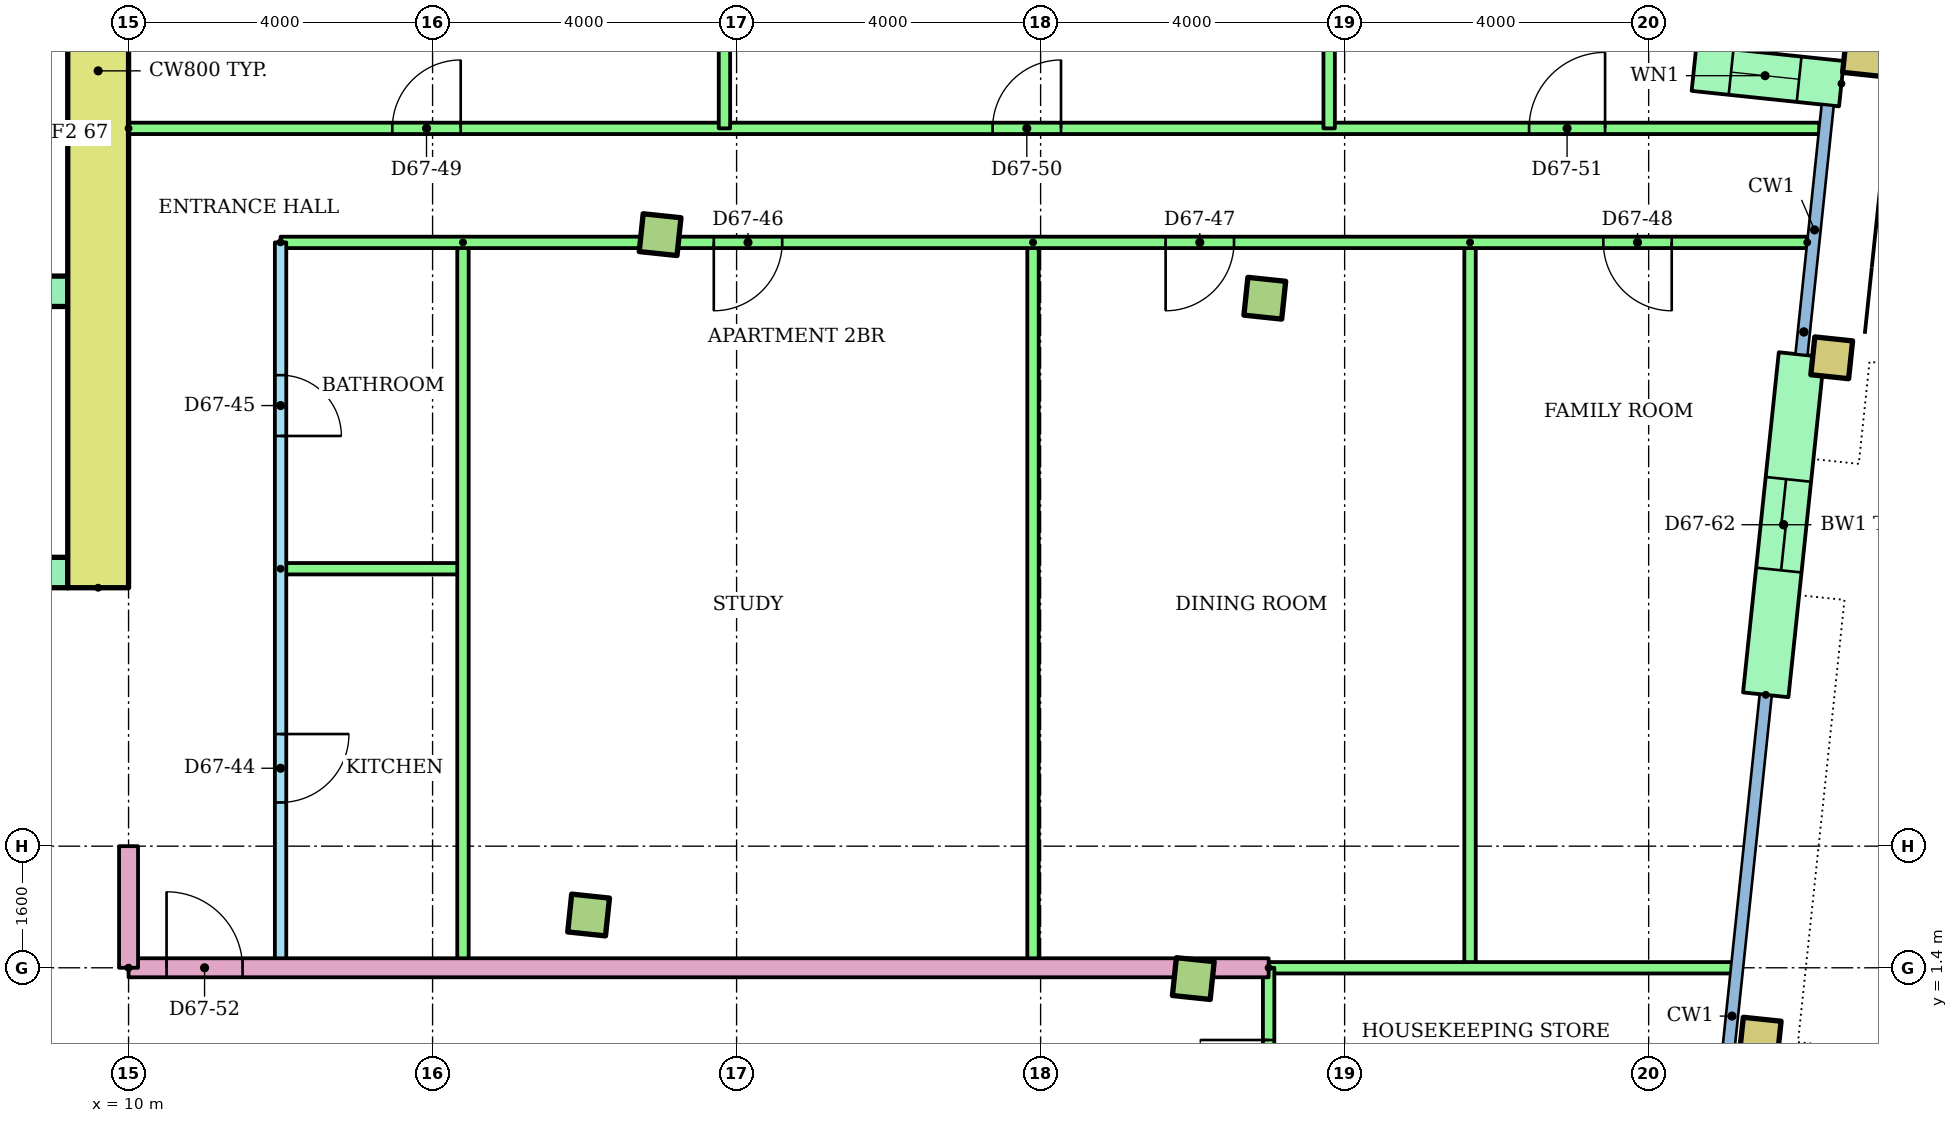
"""IFC4 building model, lengths in metres.
Left out: names, types, materials, properties, quantities, classifications, styles, units other than length and angle.
Written with IfcOpenShell. Run it as: python <this file> out.ifc"""

import sys

from ifc_helpers import new_model, si_unit, direction, frame, frame_2d, origin, origin_2d, place, context, subcontext, project, spatial, rectangle, hollow_rectangle, extrude, element, fill, save


model = new_model("IFC4")
c1 = context("Model", 3, precision=1e-05, world=origin(), true_north=direction((0.0, 1.0)))
c2 = subcontext(c1, "Body", "Model", "MODEL_VIEW")
j1 = project(units=[si_unit("LENGTHUNIT", "METRE"), si_unit("PLANEANGLEUNIT", "RADIAN")], contexts=[c1])
p1 = place(None, origin())
s1 = spatial("IfcSite", under=j1, at=p1, CompositionType="ELEMENT")
p2 = place(p1, origin())
s2 = spatial("IfcBuilding", under=s1, at=p2, CompositionType="ELEMENT")
p3 = place(p2, frame((0.0, 0.0, 259.5)))
s3 = spatial("IfcBuildingStorey", under=s2, at=p3, CompositionType="ELEMENT", Elevation=259.5)
for number, where, z_axis, x_axis in (
    (1, (16.053, 2.094, 0.0), (0.0, 0.0, 1.0), (0.995, -0.105, 0.0)),
    (2, (24.009, 1.258, 0.0), (0.0, 0.0, 1.0), (0.995, -0.105, 0.0)),
):
    element("IfcColumn", number, at=place(p3, frame(where, z_axis=z_axis, x_axis=x_axis)), inside=s3, PredefinedType="COLUMN", context=c2, shape_type="SweptSolid", body=[
        extrude(rectangle(XDim=0.5, YDim=0.5, at=origin_2d()), origin(), (0.0, 0.0, 1.0), 3.2),
    ])
p4 = place(p3, frame((31.468, 0.474, 0.0), z_axis=(0.0, 0.0, 1.0), x_axis=(0.994521895368, -0.104528463268, 0.0)))
e3 = element("IfcColumn", 3, at=p4, inside=s3, PredefinedType="COLUMN", context=c2, shape_type="SweptSolid", body=[
    extrude(hollow_rectangle(XDim=0.5, YDim=0.5, WallThickness=0.025, at=origin_2d()), origin(), (0.0, 0.0, 1.0), 3.2),
])
for number, where, z_axis, x_axis in (
    (4, (16.993, 11.045, 0.0), (0.0, 0.0, 1.0), (0.995, -0.105, 0.0)),
    (5, (24.95, 10.209, 0.0), (0.0, 0.0, 1.0), (0.995, -0.105, 0.0)),
):
    element("IfcColumn", number, at=place(p3, frame(where, z_axis=z_axis, x_axis=x_axis)), inside=s3, PredefinedType="COLUMN", context=c2, shape_type="SweptSolid", body=[
        extrude(rectangle(XDim=0.5, YDim=0.5, at=origin_2d()), origin(), (0.0, 0.0, 1.0), 3.2),
    ])
for number, where, z_axis, x_axis in (
    (6, (32.409, 9.425, 0.0), (0.0, 0.0, 1.0), (0.995, -0.105, 0.0)),
    (7, (32.827, 13.403, 0.0), (0.0, 0.0, 1.0), (0.995, -0.105, 0.0)),
):
    element("IfcColumn", number, at=place(p3, frame(where, z_axis=z_axis, x_axis=x_axis)), inside=s3, PredefinedType="COLUMN", context=c2, shape_type="SweptSolid", body=[
        extrude(hollow_rectangle(XDim=0.5, YDim=0.5, WallThickness=0.025, at=origin_2d()), origin(), (0.0, 0.0, 1.0), 3.2),
    ])
p5 = place(p3, frame((32.536, 13.031, 0.0), z_axis=(0.0, 0.0, 1.0), x_axis=(-0.994534226826, 0.104411070641, 0.0)))
e8 = element("IfcWall", 8, at=p5, inside=s3, PredefinedType="STANDARD", context=c2, shape_type="SweptSolid", body=[
    extrude(rectangle(XDim=1.95, YDim=0.6, at=frame_2d((0.975, 0.0))), origin(), (0.0, 0.0, 1.0), 2.92),
])
p6 = place(p5, frame((0.56, 0.0, 0.9)))
e9 = element("IfcOpeningElement", 9, at=p6, cuts=e8, PredefinedType="OPENING", context=c2, shape_type="SweptSolid", body=[
    extrude(rectangle(XDim=0.9, YDim=1.5, at=frame_2d((0.45, 0.75))), frame((0.0, 0.31, 0.0), z_axis=(0.0, -1.0, 0.0), x_axis=(1.0, 0.0, 0.0)), (0.0, 0.0, 1.0), 0.62),
])
p7 = place(p3, frame((31.54, 4.991, 0.0), z_axis=(0.0, 0.0, 1.0), x_axis=(0.104546400045, 0.994520009974, 0.0)))
e10 = element("IfcWall", 10, at=p7, inside=s3, PredefinedType="STANDARD", context=c2, shape_type="SweptSolid", body=[
    extrude(rectangle(XDim=4.5, YDim=0.6, at=frame_2d((2.25, 0.0))), origin(), (0.0, 0.0, 1.0), 2.92),
])
p8 = place(p7, frame((1.65, 0.0, 0.0)))
e11 = element("IfcOpeningElement", 11, at=p8, cuts=e10, PredefinedType="OPENING", context=c2, shape_type="SweptSolid", body=[
    extrude(rectangle(XDim=1.2, YDim=2.1, at=frame_2d((0.6, 1.05))), frame((0.0, 0.31, 0.0), z_axis=(0.0, -1.0, 0.0), x_axis=(1.0, 0.0, 0.0)), (0.0, 0.0, 1.0), 0.62),
])
p9 = place(p3, frame((9.6, 6.4, 0.0), z_axis=(0.0, 0.0, 1.0), x_axis=(0.0, 1.0, 0.0)))
e12 = element("IfcWall", 12, at=p9, inside=s3, PredefinedType="SHEAR", context=c2, shape_type="SweptSolid", body=[
    extrude(rectangle(XDim=13.6, YDim=0.8, at=frame_2d((6.8, 0.0))), origin(), (0.0, 0.0, 1.0), 2.92),
])
p10 = place(p3, frame((-9.2, 6.6, 0.0)))
e13 = element("IfcWall", 13, at=p10, inside=s3, PredefinedType="SHEAR", context=c2, shape_type="SweptSolid", body=[
    extrude(rectangle(XDim=18.4, YDim=0.4, at=frame_2d((9.2, 0.0))), origin(), (0.0, 0.0, 1.0), 2.92),
])
p11 = place(p10, frame((8.3, 0.0, 0.0)))
e14 = element("IfcOpeningElement", 14, at=p11, cuts=e13, PredefinedType="OPENING", context=c2, shape_type="SweptSolid", body=[
    extrude(rectangle(XDim=1.8, YDim=2.1, at=frame_2d((0.9, 1.05))), frame((0.0, 0.21, 0.0), z_axis=(0.0, -1.0, 0.0), x_axis=(1.0, 0.0, 0.0)), (0.0, 0.0, 1.0), 0.42),
])
p12 = place(p10, frame((3.8, 0.0, 0.0)))
e15 = element("IfcOpeningElement", 15, at=p12, cuts=e13, PredefinedType="OPENING", context=c2, shape_type="SweptSolid", body=[
    extrude(rectangle(XDim=1.8, YDim=2.1, at=frame_2d((0.9, 1.05))), frame((0.0, 0.21, 0.0), z_axis=(0.0, -1.0, 0.0), x_axis=(1.0, 0.0, 0.0)), (0.0, 0.0, 1.0), 0.42),
])
p13 = place(p10, frame((12.8, 0.0, 0.0)))
e16 = element("IfcOpeningElement", 16, at=p13, cuts=e13, PredefinedType="OPENING", context=c2, shape_type="SweptSolid", body=[
    extrude(rectangle(XDim=1.8, YDim=2.1, at=frame_2d((0.9, 1.05))), frame((0.0, 0.21, 0.0), z_axis=(0.0, -1.0, 0.0), x_axis=(1.0, 0.0, 0.0)), (0.0, 0.0, 1.0), 0.42),
])
p14 = place(p3, frame((1.2, 10.3, 0.0)))
e17 = element("IfcWall", 17, at=p14, inside=s3, PredefinedType="SHEAR", context=c2, shape_type="SweptSolid", body=[
    extrude(rectangle(XDim=8.0, YDim=0.4, at=frame_2d((4.0, 0.0))), origin(), (0.0, 0.0, 1.0), 2.92),
])
p15 = place(p14, frame((0.817, 0.0, 0.0)))
e18 = element("IfcOpeningElement", 18, at=p15, cuts=e17, PredefinedType="OPENING", context=c2, shape_type="SweptSolid", body=[
    extrude(rectangle(XDim=1.1, YDim=2.1, at=frame_2d((0.55, 1.05))), frame((0.0, 0.21, 0.0), z_axis=(0.0, -1.0, 0.0), x_axis=(1.0, 0.0, 0.0)), (0.0, 0.0, 1.0), 0.42),
])
p16 = place(p14, frame((3.55, 0.0, 0.0)))
e19 = element("IfcOpeningElement", 19, at=p16, cuts=e17, PredefinedType="OPENING", context=c2, shape_type="SweptSolid", body=[
    extrude(rectangle(XDim=1.1, YDim=2.1, at=frame_2d((0.55, 1.05))), frame((0.0, 0.21, 0.0), z_axis=(0.0, -1.0, 0.0), x_axis=(1.0, 0.0, 0.0)), (0.0, 0.0, 1.0), 0.42),
])
p17 = place(p14, frame((6.283, 0.0, 0.0)))
e20 = element("IfcOpeningElement", 20, at=p17, cuts=e17, PredefinedType="OPENING", context=c2, shape_type="SweptSolid", body=[
    extrude(rectangle(XDim=1.1, YDim=2.1, at=frame_2d((0.55, 1.05))), frame((0.0, 0.21, 0.0), z_axis=(0.0, -1.0, 0.0), x_axis=(1.0, 0.0, 0.0)), (0.0, 0.0, 1.0), 0.42),
])
p18 = place(p3, frame((12.0, 10.943, 0.0), z_axis=(0.0, 0.0, 1.0), x_axis=(0.0, -1.0, 0.0)))
e21 = element("IfcWall", 21, at=p18, inside=s3, PredefinedType="PARTITIONING", context=c2, shape_type="SweptSolid", body=[
    extrude(rectangle(XDim=9.543, YDim=0.15, at=frame_2d((4.772, 0.0))), origin(), (0.0, 0.0, 1.0), 2.4),
])
p19 = place(p18, frame((6.469, 0.0, 0.0)))
e22 = element("IfcOpeningElement", 22, at=p19, cuts=e21, PredefinedType="OPENING", context=c2, shape_type="SweptSolid", body=[
    extrude(rectangle(XDim=0.9, YDim=2.1, at=frame_2d((0.45, 1.05))), frame((0.0, 0.085, 0.0), z_axis=(0.0, -1.0, 0.0), x_axis=(1.0, 0.0, 0.0)), (0.0, 0.0, 1.0), 0.17),
])
p20 = place(p18, frame((1.747, 0.0, 0.0)))
e23 = element("IfcOpeningElement", 23, at=p20, cuts=e21, PredefinedType="OPENING", context=c2, shape_type="SweptSolid", body=[
    extrude(rectangle(XDim=0.8, YDim=2.1, at=frame_2d((0.4, 1.05))), frame((0.0, 0.085, 0.0), z_axis=(0.0, -1.0, 0.0), x_axis=(1.0, 0.0, 0.0)), (0.0, 0.0, 1.0), 0.17),
])
p21 = place(p3, frame((12.0, 6.65, 0.0)))
e24 = element("IfcWall", 24, at=p21, inside=s3, PredefinedType="PARTITIONING", context=c2, shape_type="SweptSolid", body=[
    extrude(rectangle(XDim=2.4, YDim=0.15, at=frame_2d((1.2, 0.0))), origin(), (0.0, 0.0, 1.0), 2.4),
])
for number, where, z_axis, x_axis in (
    (25, (14.4, 10.943, 0.0), (0.0, 0.0, 1.0), (0.0, -1.0, 0.0)),
    (26, (21.9, 10.943, 0.0), (0.0, 0.0, 1.0), (0.0, -1.0, 0.0)),
    (27, (27.65, 10.943, 0.0), (0.0, 0.0, 1.0), (0.0, -1.0, 0.0)),
):
    element("IfcWall", number, at=place(p3, frame(where, z_axis=z_axis, x_axis=x_axis)), inside=s3, PredefinedType="PARTITIONING", context=c2, shape_type="SweptSolid", body=[
        extrude(rectangle(XDim=9.543, YDim=0.15, at=frame_2d((4.772, 0.0))), origin(), (0.0, 0.0, 1.0), 2.4),
    ])
p22 = place(p3, frame((32.087, 10.943, 0.0), z_axis=(0.0, 0.0, 1.0), x_axis=(-1.0, 0.0, 0.0)))
e28 = element("IfcWall", 28, at=p22, inside=s3, PredefinedType="PARTITIONING", context=c2, shape_type="SweptSolid", body=[
    extrude(rectangle(XDim=20.087, YDim=0.15, at=frame_2d((10.043, 0.0))), origin(), (0.0, 0.0, 1.0), 2.4),
])
p23 = place(p22, frame((13.487, 0.0, 0.0)))
e29 = element("IfcOpeningElement", 29, at=p23, cuts=e28, PredefinedType="OPENING", context=c2, shape_type="SweptSolid", body=[
    extrude(rectangle(XDim=0.9, YDim=2.1, at=frame_2d((0.45, 1.05))), frame((0.0, 0.085, 0.0), z_axis=(0.0, -1.0, 0.0), x_axis=(1.0, 0.0, 0.0)), (0.0, 0.0, 1.0), 0.17),
])
p24 = place(p22, frame((7.542, 0.0, 0.0)))
e30 = element("IfcOpeningElement", 30, at=p24, cuts=e28, PredefinedType="OPENING", context=c2, shape_type="SweptSolid", body=[
    extrude(rectangle(XDim=0.9, YDim=2.1, at=frame_2d((0.45, 1.05))), frame((0.0, 0.085, 0.0), z_axis=(0.0, -1.0, 0.0), x_axis=(1.0, 0.0, 0.0)), (0.0, 0.0, 1.0), 0.17),
])
p25 = place(p22, frame((1.783, 0.0, 0.0)))
e31 = element("IfcOpeningElement", 31, at=p25, cuts=e28, PredefinedType="OPENING", context=c2, shape_type="SweptSolid", body=[
    extrude(rectangle(XDim=0.9, YDim=2.1, at=frame_2d((0.45, 1.05))), frame((0.0, 0.085, 0.0), z_axis=(0.0, -1.0, 0.0), x_axis=(1.0, 0.0, 0.0)), (0.0, 0.0, 1.0), 0.17),
])
p26 = place(p3, frame((10.0, 12.443, 0.0)))
e32 = element("IfcWall", 32, at=p26, inside=s3, PredefinedType="PARTITIONING", context=c2, shape_type="SweptSolid", body=[
    extrude(rectangle(XDim=22.244, YDim=0.15, at=frame_2d((11.122, 0.0))), origin(), (0.0, 0.0, 1.0), 2.4),
])
p27 = place(p26, frame((3.47, 0.0, 0.0)))
e33 = element("IfcOpeningElement", 33, at=p27, cuts=e32, PredefinedType="OPENING", context=c2, shape_type="SweptSolid", body=[
    extrude(rectangle(XDim=0.9, YDim=2.1, at=frame_2d((0.45, 1.05))), frame((0.0, 0.085, 0.0), z_axis=(0.0, -1.0, 0.0), x_axis=(1.0, 0.0, 0.0)), (0.0, 0.0, 1.0), 0.17),
])
p28 = place(p26, frame((11.368, 0.0, 0.0)))
e34 = element("IfcOpeningElement", 34, at=p28, cuts=e32, PredefinedType="OPENING", context=c2, shape_type="SweptSolid", body=[
    extrude(rectangle(XDim=0.9, YDim=2.1, at=frame_2d((0.45, 1.05))), frame((0.0, 0.085, 0.0), z_axis=(0.0, -1.0, 0.0), x_axis=(1.0, 0.0, 0.0)), (0.0, 0.0, 1.0), 0.17),
])
p29 = place(p26, frame((18.427, 0.0, 0.0)))
e35 = element("IfcOpeningElement", 35, at=p29, cuts=e32, PredefinedType="OPENING", context=c2, shape_type="SweptSolid", body=[
    extrude(rectangle(XDim=1.0, YDim=2.1, at=frame_2d((0.5, 1.05))), frame((0.0, 0.085, 0.0), z_axis=(0.0, -1.0, 0.0), x_axis=(1.0, 0.0, 0.0)), (0.0, 0.0, 1.0), 0.17),
])
p30 = place(p3, frame((17.84, 19.021, 0.0), z_axis=(0.0, 0.0, 1.0), x_axis=(0.0, -1.0, 0.0)))
e36 = element("IfcWall", 36, at=p30, inside=s3, PredefinedType="PARTITIONING", context=c2, shape_type="SweptSolid", body=[
    extrude(rectangle(XDim=6.578, YDim=0.15, at=frame_2d((3.289, 0.0))), origin(), (0.0, 0.0, 1.0), 2.4),
])
p31 = place(p3, frame((25.796, 18.185, 0.0), z_axis=(0.0, 0.0, 1.0), x_axis=(0.0, -1.0, 0.0)))
e37 = element("IfcWall", 37, at=p31, inside=s3, PredefinedType="PARTITIONING", context=c2, shape_type="SweptSolid", body=[
    extrude(rectangle(XDim=5.741, YDim=0.15, at=frame_2d((2.871, 0.0))), origin(), (0.0, 0.0, 1.0), 2.4),
])
p32 = place(p3, frame((10.0, 1.4, 0.0)))
e38 = element("IfcWall", 38, at=p32, inside=s3, PredefinedType="PARTITIONING", context=c2, shape_type="SweptSolid", body=[
    extrude(rectangle(XDim=15.0, YDim=0.25, at=frame_2d((7.5, 0.0))), origin(), (0.0, 0.0, 1.0), 2.4),
])
p33 = place(p32, frame((0.5, 0.0, 0.0)))
e39 = element("IfcOpeningElement", 39, at=p33, cuts=e38, PredefinedType="OPENING", context=c2, shape_type="SweptSolid", body=[
    extrude(rectangle(XDim=1.0, YDim=2.1, at=frame_2d((0.5, 1.05))), frame((0.0, 0.135, 0.0), z_axis=(0.0, -1.0, 0.0), x_axis=(1.0, 0.0, 0.0)), (0.0, 0.0, 1.0), 0.27),
])
p34 = place(p3, frame((25.0, 1.4, 0.0)))
e40 = element("IfcWall", 40, at=p34, inside=s3, PredefinedType="PARTITIONING", context=c2, shape_type="SweptSolid", body=[
    extrude(rectangle(XDim=6.093, YDim=0.15, at=frame_2d((3.046, 0.0))), origin(), (0.0, 0.0, 1.0), 2.4),
])
p35 = place(p3, frame((25.0, -1.4, 0.0), z_axis=(0.0, 0.0, 1.0), x_axis=(0.0, 1.0, 0.0)))
e41 = element("IfcWall", 41, at=p35, inside=s3, PredefinedType="PARTITIONING", context=c2, shape_type="SweptSolid", body=[
    extrude(rectangle(XDim=2.8, YDim=0.15, at=frame_2d((1.4, 0.0))), origin(), (0.0, 0.0, 1.0), 2.4),
])
p36 = place(p35, frame((0.95, 0.0, 0.0)))
e42 = element("IfcOpeningElement", 42, at=p36, cuts=e41, PredefinedType="OPENING", context=c2, shape_type="SweptSolid", body=[
    extrude(rectangle(XDim=0.9, YDim=2.1, at=frame_2d((0.45, 1.05))), frame((0.0, 0.085, 0.0), z_axis=(0.0, -1.0, 0.0), x_axis=(1.0, 0.0, 0.0)), (0.0, 0.0, 1.0), 0.17),
])
p37 = place(p3, frame((10.0, 1.4, 0.0), z_axis=(0.0, 0.0, 1.0), x_axis=(0.0, 1.0, 0.0)))
e43 = element("IfcWall", 43, at=p37, inside=s3, PredefinedType="PARTITIONING", context=c2, shape_type="SweptSolid", body=[
    extrude(rectangle(XDim=1.6, YDim=0.25, at=frame_2d((0.8, 0.0))), origin(), (0.0, 0.0, 1.0), 2.4),
])
p38 = place(p6, origin())
e44 = element("IfcWindow", 44, at=p38, inside=s3, PartitioningType="SINGLE_PANEL", PredefinedType="WINDOW", context=c2, shape_type="SweptSolid", body=[
    extrude(rectangle(XDim=0.9, YDim=1.5, at=frame_2d((0.45, 0.75))), frame((0.0, 0.03, 0.0), z_axis=(0.0, -1.0, 0.0), x_axis=(1.0, 0.0, 0.0)), (0.0, 0.0, 1.0), 0.06),
])
fill(e9, e44)
p39 = place(p19, origin())
e45 = element("IfcDoor", 45, at=p39, inside=s3, OperationType="SINGLE_SWING_LEFT", PredefinedType="DOOR", context=c2, shape_type="SweptSolid", body=[
    extrude(rectangle(XDim=0.9, YDim=2.1, at=frame_2d((0.45, 1.05))), frame((0.0, 0.025, 0.0), z_axis=(0.0, -1.0, 0.0), x_axis=(1.0, 0.0, 0.0)), (0.0, 0.0, 1.0), 0.05),
])
fill(e22, e45)
p40 = place(p20, origin())
e46 = element("IfcDoor", 46, at=p40, inside=s3, OperationType="SINGLE_SWING_RIGHT", PredefinedType="DOOR", context=c2, shape_type="SweptSolid", body=[
    extrude(rectangle(XDim=0.8, YDim=2.1, at=frame_2d((0.4, 1.05))), frame((0.0, 0.025, 0.0), z_axis=(0.0, -1.0, 0.0), x_axis=(1.0, 0.0, 0.0)), (0.0, 0.0, 1.0), 0.05),
])
fill(e23, e46)
p41 = place(p23, origin())
e47 = element("IfcDoor", 47, at=p41, inside=s3, OperationType="SINGLE_SWING_RIGHT", PredefinedType="DOOR", context=c2, shape_type="SweptSolid", body=[
    extrude(rectangle(XDim=0.9, YDim=2.1, at=frame_2d((0.45, 1.05))), frame((0.0, 0.025, 0.0), z_axis=(0.0, -1.0, 0.0), x_axis=(1.0, 0.0, 0.0)), (0.0, 0.0, 1.0), 0.05),
])
fill(e29, e47)
p42 = place(p24, origin())
e48 = element("IfcDoor", 48, at=p42, inside=s3, OperationType="SINGLE_SWING_RIGHT", PredefinedType="DOOR", context=c2, shape_type="SweptSolid", body=[
    extrude(rectangle(XDim=0.9, YDim=2.1, at=frame_2d((0.45, 1.05))), frame((0.0, 0.025, 0.0), z_axis=(0.0, -1.0, 0.0), x_axis=(1.0, 0.0, 0.0)), (0.0, 0.0, 1.0), 0.05),
])
fill(e30, e48)
p43 = place(p25, origin())
e49 = element("IfcDoor", 49, at=p43, inside=s3, OperationType="SINGLE_SWING_LEFT", PredefinedType="DOOR", context=c2, shape_type="SweptSolid", body=[
    extrude(rectangle(XDim=0.9, YDim=2.1, at=frame_2d((0.45, 1.05))), frame((0.0, 0.025, 0.0), z_axis=(0.0, -1.0, 0.0), x_axis=(1.0, 0.0, 0.0)), (0.0, 0.0, 1.0), 0.05),
])
fill(e31, e49)
p44 = place(p27, origin())
e50 = element("IfcDoor", 50, at=p44, inside=s3, OperationType="SINGLE_SWING_RIGHT", PredefinedType="DOOR", context=c2, shape_type="SweptSolid", body=[
    extrude(rectangle(XDim=0.9, YDim=2.1, at=frame_2d((0.45, 1.05))), frame((0.0, 0.025, 0.0), z_axis=(0.0, -1.0, 0.0), x_axis=(1.0, 0.0, 0.0)), (0.0, 0.0, 1.0), 0.05),
])
fill(e33, e50)
p45 = place(p28, origin())
e51 = element("IfcDoor", 51, at=p45, inside=s3, OperationType="SINGLE_SWING_RIGHT", PredefinedType="DOOR", context=c2, shape_type="SweptSolid", body=[
    extrude(rectangle(XDim=0.9, YDim=2.1, at=frame_2d((0.45, 1.05))), frame((0.0, 0.025, 0.0), z_axis=(0.0, -1.0, 0.0), x_axis=(1.0, 0.0, 0.0)), (0.0, 0.0, 1.0), 0.05),
])
fill(e34, e51)
p46 = place(p29, origin())
e52 = element("IfcDoor", 52, at=p46, inside=s3, OperationType="SINGLE_SWING_RIGHT", PredefinedType="DOOR", context=c2, shape_type="SweptSolid", body=[
    extrude(rectangle(XDim=1.0, YDim=2.1, at=frame_2d((0.5, 1.05))), frame((0.0, 0.025, 0.0), z_axis=(0.0, -1.0, 0.0), x_axis=(1.0, 0.0, 0.0)), (0.0, 0.0, 1.0), 0.05),
])
fill(e35, e52)
p47 = place(p33, origin())
e53 = element("IfcDoor", 53, at=p47, inside=s3, OperationType="SINGLE_SWING_LEFT", PredefinedType="DOOR", context=c2, shape_type="SweptSolid", body=[
    extrude(rectangle(XDim=1.0, YDim=2.1, at=frame_2d((0.5, 1.05))), frame((0.0, 0.025, 0.0), z_axis=(0.0, -1.0, 0.0), x_axis=(1.0, 0.0, 0.0)), (0.0, 0.0, 1.0), 0.05),
])
fill(e39, e53)
p48 = place(p36, origin())
e54 = element("IfcDoor", 54, at=p48, inside=s3, OperationType="SINGLE_SWING_RIGHT", PredefinedType="DOOR", context=c2, shape_type="SweptSolid", body=[
    extrude(rectangle(XDim=0.9, YDim=2.1, at=frame_2d((0.45, 1.05))), frame((0.0, 0.025, 0.0), z_axis=(0.0, -1.0, 0.0), x_axis=(1.0, 0.0, 0.0)), (0.0, 0.0, 1.0), 0.05),
])
fill(e42, e54)
p49 = place(p8, origin())
e55 = element("IfcDoor", 55, at=p49, inside=s3, OperationType="SLIDING_TO_LEFT", PredefinedType="DOOR", context=c2, shape_type="SweptSolid", body=[
    extrude(rectangle(XDim=1.2, YDim=2.1, at=frame_2d((0.6, 1.05))), frame((0.0, 0.025, 0.0), z_axis=(0.0, -1.0, 0.0), x_axis=(1.0, 0.0, 0.0)), (0.0, 0.0, 1.0), 0.05),
])
fill(e11, e55)
save(model, sys.argv[1])
